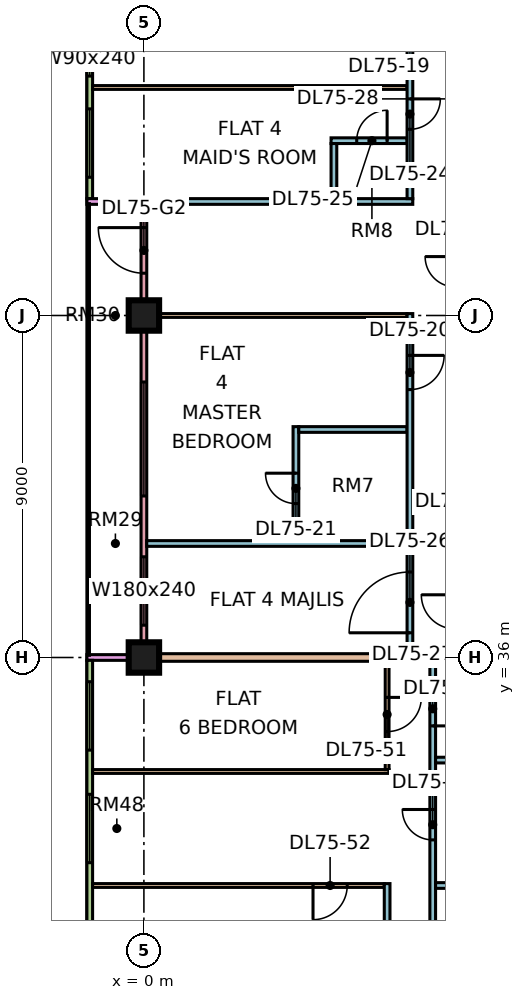
"""IFC4 building model, lengths in metres.
Left out: names, types, materials, properties, quantities, classifications, styles, units other than length and angle.
Written with IfcOpenShell. Run it as: python <this file> out.ifc"""

import sys

from ifc_helpers import new_model, si_unit, direction, frame, frame_2d, origin, origin_2d, place, context, subcontext, project, spatial, rectangle, extrude, element, fill, save


model = new_model("IFC4")
c1 = context("Model", 3, precision=1e-05, world=origin(), true_north=direction((0.0, 1.0)))
c2 = subcontext(c1, "Body", "Model", "MODEL_VIEW")
j1 = project(units=[si_unit("LENGTHUNIT", "METRE"), si_unit("PLANEANGLEUNIT", "RADIAN")], contexts=[c1])
p1 = place(None, origin())
s1 = spatial("IfcSite", under=j1, at=p1, CompositionType="ELEMENT")
p2 = place(p1, origin())
s2 = spatial("IfcBuilding", under=s1, at=p2, CompositionType="ELEMENT")
p3 = place(p2, frame((0.0, 0.0, 318.4)))
s3 = spatial("IfcBuildingStorey", under=s2, at=p3, CompositionType="ELEMENT", Elevation=318.4)
p4 = place(p3, frame((0.0, 36.0, 0.0), z_axis=(0.0, 0.0, 1.0), x_axis=(1.0, 0.0, 0.0)))
e1 = element("IfcColumn", 1, at=p4, inside=s3, PredefinedType="COLUMN", context=c2, shape_type="SweptSolid", body=[
    extrude(rectangle(XDim=0.8, YDim=0.8, at=origin_2d()), origin(), (0.0, 0.0, 1.0), 3.75),
])
p5 = place(p3, frame((0.0, 45.0, 0.0), z_axis=(0.0, 0.0, 1.0), x_axis=(1.0, 0.0, 0.0)))
e2 = element("IfcColumn", 2, at=p5, inside=s3, PredefinedType="COLUMN", context=c2, shape_type="SweptSolid", body=[
    extrude(rectangle(XDim=0.8, YDim=0.8, at=origin_2d()), origin(), (0.0, 0.0, 1.0), 3.75),
])
p6 = place(p3, frame((-1.425, 52.5, 0.0), z_axis=(0.0, 0.0, 1.0), x_axis=(0.0, -1.0, 0.0)))
e3 = element("IfcWall", 3, at=p6, inside=s3, PredefinedType="SOLIDWALL", context=c2, shape_type="SweptSolid", body=[
    extrude(rectangle(XDim=4.425, YDim=0.15, at=frame_2d((2.212, 0.0))), origin(), (0.0, 0.0, 1.0), 3.3),
])
p7 = place(p6, frame((0.3, 0.0, 0.45)))
e4 = element("IfcOpeningElement", 4, at=p7, cuts=e3, PredefinedType="OPENING", context=c2, shape_type="SweptSolid", body=[
    extrude(rectangle(XDim=0.9, YDim=2.4, at=frame_2d((0.45, 1.2))), frame((0.0, 0.085, 0.0), z_axis=(0.0, -1.0, 0.0), x_axis=(1.0, 0.0, 0.0)), (0.0, 0.0, 1.0), 0.17),
])
p8 = place(p6, frame((2.062, 0.0, 0.45)))
e5 = element("IfcOpeningElement", 5, at=p8, cuts=e3, PredefinedType="OPENING", context=c2, shape_type="SweptSolid", body=[
    extrude(rectangle(XDim=1.8, YDim=2.4, at=frame_2d((0.9, 1.2))), frame((0.0, 0.085, 0.0), z_axis=(0.0, -1.0, 0.0), x_axis=(1.0, 0.0, 0.0)), (0.0, 0.0, 1.0), 0.17),
])
p9 = place(p3, frame((0.0, 47.925, 0.0), z_axis=(0.0, 0.0, 1.0), x_axis=(0.0, -1.0, 0.0)))
e6 = element("IfcWall", 6, at=p9, inside=s3, PredefinedType="SOLIDWALL", context=c2, shape_type="SweptSolid", body=[
    extrude(rectangle(XDim=11.85, YDim=0.15, at=frame_2d((5.925, 0.0))), origin(), (0.0, 0.0, 1.0), 3.3),
])
p10 = place(p9, frame((0.613, 0.0, 0.0)))
e7 = element("IfcOpeningElement", 7, at=p10, cuts=e6, PredefinedType="OPENING", context=c2, shape_type="SweptSolid", body=[
    extrude(rectangle(XDim=1.2, YDim=2.4, at=frame_2d((0.6, 1.2))), frame((0.0, 0.085, 0.0), z_axis=(0.0, -1.0, 0.0), x_axis=(1.0, 0.0, 0.0)), (0.0, 0.0, 1.0), 0.17),
])
p11 = place(p9, frame((4.675, 0.0, 0.45)))
e8 = element("IfcOpeningElement", 8, at=p11, cuts=e6, PredefinedType="OPENING", context=c2, shape_type="SweptSolid", body=[
    extrude(rectangle(XDim=3.0, YDim=2.4, at=frame_2d((1.5, 1.2))), frame((0.0, 0.085, 0.0), z_axis=(0.0, -1.0, 0.0), x_axis=(1.0, 0.0, 0.0)), (0.0, 0.0, 1.0), 0.17),
])
p12 = place(p9, frame((9.275, 0.0, 0.45)))
e9 = element("IfcOpeningElement", 9, at=p12, cuts=e6, PredefinedType="OPENING", context=c2, shape_type="SweptSolid", body=[
    extrude(rectangle(XDim=1.8, YDim=2.4, at=frame_2d((0.9, 1.2))), frame((0.0, 0.085, 0.0), z_axis=(0.0, -1.0, 0.0), x_axis=(1.0, 0.0, 0.0)), (0.0, 0.0, 1.0), 0.17),
])
for number, where, z_axis, x_axis in (
    (10, (-1.5, 48.0, 0.0), (0.0, 0.0, 1.0), (1.0, 0.0, 0.0)),
    (11, (-1.5, 36.0, 0.0), (0.0, 0.0, 1.0), (1.0, 0.0, 0.0)),
):
    element("IfcWall", number, at=place(p3, frame(where, z_axis=z_axis, x_axis=x_axis)), inside=s3, PredefinedType="SOLIDWALL", context=c2, shape_type="SweptSolid", body=[
        extrude(rectangle(XDim=1.5, YDim=0.15, at=frame_2d((0.75, 0.0))), origin(), (0.0, 0.0, 1.0), 3.3),
    ])
p13 = place(p3, frame((-1.425, 35.925, 0.0), z_axis=(0.0, 0.0, 1.0), x_axis=(0.0, -1.0, 0.0)))
e12 = element("IfcWall", 12, at=p13, inside=s3, PredefinedType="SOLIDWALL", context=c2, shape_type="SweptSolid", body=[
    extrude(rectangle(XDim=11.85, YDim=0.15, at=frame_2d((5.925, 0.0))), origin(), (0.0, 0.0, 1.0), 3.3),
])
p14 = place(p13, frame((0.562, 0.0, 0.45)))
e13 = element("IfcOpeningElement", 13, at=p14, cuts=e12, PredefinedType="OPENING", context=c2, shape_type="SweptSolid", body=[
    extrude(rectangle(XDim=1.8, YDim=2.4, at=frame_2d((0.9, 1.2))), frame((0.0, 0.085, 0.0), z_axis=(0.0, -1.0, 0.0), x_axis=(1.0, 0.0, 0.0)), (0.0, 0.0, 1.0), 0.17),
])
p15 = place(p13, frame((3.525, 0.0, 0.45)))
e14 = element("IfcOpeningElement", 14, at=p15, cuts=e12, PredefinedType="OPENING", context=c2, shape_type="SweptSolid", body=[
    extrude(rectangle(XDim=1.8, YDim=2.4, at=frame_2d((0.9, 1.2))), frame((0.0, 0.085, 0.0), z_axis=(0.0, -1.0, 0.0), x_axis=(1.0, 0.0, 0.0)), (0.0, 0.0, 1.0), 0.17),
])
p16 = place(p13, frame((7.387, 0.0, 0.45)))
e15 = element("IfcOpeningElement", 15, at=p16, cuts=e12, PredefinedType="OPENING", context=c2, shape_type="SweptSolid", body=[
    extrude(rectangle(XDim=3.0, YDim=2.4, at=frame_2d((1.5, 1.2))), frame((0.0, 0.085, 0.0), z_axis=(0.0, -1.0, 0.0), x_axis=(1.0, 0.0, 0.0)), (0.0, 0.0, 1.0), 0.17),
])
p17 = place(p3, frame((-1.351, 51.0, 0.0), z_axis=(0.0, 0.0, 1.0), x_axis=(1.0, 0.0, 0.0)))
e16 = element("IfcWall", 16, at=p17, inside=s3, PredefinedType="PARTITIONING", context=c2, shape_type="SweptSolid", body=[
    extrude(rectangle(XDim=8.276, YDim=0.1, at=frame_2d((4.138, 0.0))), origin(), (0.0, 0.0, 1.0), 3.3),
])
p18 = place(p3, frame((-1.35, 30.0, 0.0), z_axis=(0.0, 0.0, 1.0), x_axis=(1.0, 0.0, 0.0)))
e17 = element("IfcWall", 17, at=p18, inside=s3, PredefinedType="PARTITIONING", context=c2, shape_type="SweptSolid", body=[
    extrude(rectangle(XDim=7.675, YDim=0.1, at=frame_2d((3.837, 0.0))), origin(), (0.0, 0.0, 1.0), 3.3),
])
p19 = place(p18, frame((5.8, 0.0, 0.0)))
e18 = element("IfcOpeningElement", 18, at=p19, cuts=e17, PredefinedType="OPENING", context=c2, shape_type="SweptSolid", body=[
    extrude(rectangle(XDim=0.9, YDim=2.1, at=frame_2d((0.45, 1.05))), frame((0.0, 0.06, 0.0), z_axis=(0.0, -1.0, 0.0), x_axis=(1.0, 0.0, 0.0)), (0.0, 0.0, 1.0), 0.12),
])
p20 = place(p3, frame((-1.35, 33.0, 0.0), z_axis=(0.0, 0.0, 1.0), x_axis=(1.0, 0.0, 0.0)))
e19 = element("IfcWall", 19, at=p20, inside=s3, PredefinedType="PARTITIONING", context=c2, shape_type="SweptSolid", body=[
    extrude(rectangle(XDim=7.8, YDim=0.1, at=frame_2d((3.9, 0.0))), origin(), (0.0, 0.0, 1.0), 3.3),
])
e20 = element("IfcWall", 20, at=p4, inside=s3, PredefinedType="PARTITIONING", context=c2, shape_type="SweptSolid", body=[
    extrude(rectangle(XDim=12.3, YDim=0.2, at=frame_2d((6.15, 0.0))), origin(), (0.0, 0.0, 1.0), 3.3),
])
p21 = place(p3, frame((0.0, 48.0, 0.0), z_axis=(0.0, 0.0, 1.0), x_axis=(1.0, 0.0, 0.0)))
e21 = element("IfcWall", 21, at=p21, inside=s3, PredefinedType="PARTITIONING", context=c2, shape_type="SweptSolid", body=[
    extrude(rectangle(XDim=7.075, YDim=0.15, at=frame_2d((3.538, 0.0))), origin(), (0.0, 0.0, 1.0), 3.3),
])
p22 = place(p3, frame((0.074, 39.0, 0.0), z_axis=(0.0, 0.0, 1.0), x_axis=(1.0, 0.0, 0.0)))
e22 = element("IfcWall", 22, at=p22, inside=s3, PredefinedType="PARTITIONING", context=c2, shape_type="SweptSolid", body=[
    extrude(rectangle(XDim=6.851, YDim=0.15, at=frame_2d((3.426, 0.0))), origin(), (0.0, 0.0, 1.0), 3.3),
])
p23 = place(p3, frame((0.074, 45.0, 0.0), z_axis=(0.0, 0.0, 1.0), x_axis=(1.0, 0.0, 0.0)))
e23 = element("IfcWall", 23, at=p23, inside=s3, PredefinedType="PARTITIONING", context=c2, shape_type="SweptSolid", body=[
    extrude(rectangle(XDim=6.851, YDim=0.1, at=frame_2d((3.426, 0.0))), origin(), (0.0, 0.0, 1.0), 3.3),
])
p24 = place(p3, frame((4.0, 39.075, 0.0), z_axis=(0.0, 0.0, 1.0), x_axis=(0.0, 1.0, 0.0)))
e24 = element("IfcWall", 24, at=p24, inside=s3, PredefinedType="PARTITIONING", context=c2, shape_type="SweptSolid", body=[
    extrude(rectangle(XDim=3.0, YDim=0.15, at=frame_2d((1.5, 0.0))), origin(), (0.0, 0.0, 1.0), 3.3),
])
p25 = place(p24, frame((0.975, 0.0, 0.0)))
e25 = element("IfcOpeningElement", 25, at=p25, cuts=e24, PredefinedType="OPENING", context=c2, shape_type="SweptSolid", body=[
    extrude(rectangle(XDim=0.8, YDim=2.1, at=frame_2d((0.4, 1.05))), frame((0.0, 0.085, 0.0), z_axis=(0.0, -1.0, 0.0), x_axis=(1.0, 0.0, 0.0)), (0.0, 0.0, 1.0), 0.17),
])
p26 = place(p3, frame((4.075, 42.0, 0.0), z_axis=(0.0, 0.0, 1.0), x_axis=(1.0, 0.0, 0.0)))
e26 = element("IfcWall", 26, at=p26, inside=s3, PredefinedType="PARTITIONING", context=c2, shape_type="SweptSolid", body=[
    extrude(rectangle(XDim=2.85, YDim=0.15, at=frame_2d((1.425, 0.0))), origin(), (0.0, 0.0, 1.0), 3.3),
])
p27 = place(p3, frame((4.925, 49.6, 0.0), z_axis=(0.0, 0.0, 1.0), x_axis=(1.0, 0.0, 0.0)))
e27 = element("IfcWall", 27, at=p27, inside=s3, PredefinedType="PARTITIONING", context=c2, shape_type="SweptSolid", body=[
    extrude(rectangle(XDim=2.0, YDim=0.15, at=frame_2d((1.0, 0.0))), origin(), (0.0, 0.0, 1.0), 3.3),
])
p28 = place(p27, frame((0.675, 0.0, 0.0)))
e28 = element("IfcOpeningElement", 28, at=p28, cuts=e27, PredefinedType="OPENING", context=c2, shape_type="SweptSolid", body=[
    extrude(rectangle(XDim=0.8, YDim=2.1, at=frame_2d((0.4, 1.05))), frame((0.0, 0.085, 0.0), z_axis=(0.0, -1.0, 0.0), x_axis=(1.0, 0.0, 0.0)), (0.0, 0.0, 1.0), 0.17),
])
p29 = place(p3, frame((5.0, 48.075, 0.0), z_axis=(0.0, 0.0, 1.0), x_axis=(0.0, 1.0, 0.0)))
e29 = element("IfcWall", 29, at=p29, inside=s3, PredefinedType="PARTITIONING", context=c2, shape_type="SweptSolid", body=[
    extrude(rectangle(XDim=1.45, YDim=0.15, at=frame_2d((0.725, 0.0))), origin(), (0.0, 0.0, 1.0), 3.3),
])
p30 = place(p3, frame((6.4, 22.5, 0.0), z_axis=(0.0, 0.0, 1.0), x_axis=(0.0, 1.0, 0.0)))
e30 = element("IfcWall", 30, at=p30, inside=s3, PredefinedType="PARTITIONING", context=c2, shape_type="SweptSolid", body=[
    extrude(rectangle(XDim=7.55, YDim=0.15, at=frame_2d((3.775, 0.0))), origin(), (0.0, 0.0, 1.0), 3.3),
])
p31 = place(p3, frame((6.4, 33.05, 0.0), z_axis=(0.0, 0.0, 1.0), x_axis=(0.0, 1.0, 0.0)))
e31 = element("IfcWall", 31, at=p31, inside=s3, PredefinedType="PARTITIONING", context=c2, shape_type="SweptSolid", body=[
    extrude(rectangle(XDim=2.85, YDim=0.1, at=frame_2d((1.425, 0.0))), origin(), (0.0, 0.0, 1.0), 3.3),
])
p32 = place(p31, frame((1.0, 0.0, 0.0)))
e32 = element("IfcOpeningElement", 32, at=p32, cuts=e31, PredefinedType="OPENING", context=c2, shape_type="SweptSolid", body=[
    extrude(rectangle(XDim=0.9, YDim=2.1, at=frame_2d((0.45, 1.05))), frame((0.0, 0.06, 0.0), z_axis=(0.0, -1.0, 0.0), x_axis=(1.0, 0.0, 0.0)), (0.0, 0.0, 1.0), 0.12),
])
p33 = place(p3, frame((7.0, 36.1, 0.0), z_axis=(0.0, 0.0, 1.0), x_axis=(0.0, 1.0, 0.0)))
e33 = element("IfcWall", 33, at=p33, inside=s3, PredefinedType="PARTITIONING", context=c2, shape_type="SweptSolid", body=[
    extrude(rectangle(XDim=8.95, YDim=0.15, at=frame_2d((4.475, 0.0))), origin(), (0.0, 0.0, 1.0), 3.3),
])
p34 = place(p33, frame((6.95, 0.0, 0.0)))
e34 = element("IfcOpeningElement", 34, at=p34, cuts=e33, PredefinedType="OPENING", context=c2, shape_type="SweptSolid", body=[
    extrude(rectangle(XDim=0.9, YDim=2.1, at=frame_2d((0.45, 1.05))), frame((0.0, 0.085, 0.0), z_axis=(0.0, -1.0, 0.0), x_axis=(1.0, 0.0, 0.0)), (0.0, 0.0, 1.0), 0.17),
])
p35 = place(p33, frame((0.55, 0.0, 0.0)))
e35 = element("IfcOpeningElement", 35, at=p35, cuts=e33, PredefinedType="OPENING", context=c2, shape_type="SweptSolid", body=[
    extrude(rectangle(XDim=1.6, YDim=2.1, at=frame_2d((0.8, 1.05))), frame((0.0, 0.085, 0.0), z_axis=(0.0, -1.0, 0.0), x_axis=(1.0, 0.0, 0.0)), (0.0, 0.0, 1.0), 0.17),
])
p36 = place(p3, frame((7.0, 48.075, 0.0), z_axis=(0.0, 0.0, 1.0), x_axis=(0.0, 1.0, 0.0)))
e36 = element("IfcWall", 36, at=p36, inside=s3, PredefinedType="PARTITIONING", context=c2, shape_type="SweptSolid", body=[
    extrude(rectangle(XDim=7.275, YDim=0.15, at=frame_2d((3.638, 0.0))), origin(), (0.0, 0.0, 1.0), 3.3),
])
p37 = place(p36, frame((3.975, 0.0, 0.0)))
e37 = element("IfcOpeningElement", 37, at=p37, cuts=e36, PredefinedType="OPENING", context=c2, shape_type="SweptSolid", body=[
    extrude(rectangle(XDim=0.9, YDim=2.1, at=frame_2d((0.45, 1.05))), frame((0.0, 0.085, 0.0), z_axis=(0.0, -1.0, 0.0), x_axis=(1.0, 0.0, 0.0)), (0.0, 0.0, 1.0), 0.17),
])
p38 = place(p36, frame((1.825, 0.0, 0.0)))
e38 = element("IfcOpeningElement", 38, at=p38, cuts=e36, PredefinedType="OPENING", context=c2, shape_type="SweptSolid", body=[
    extrude(rectangle(XDim=0.8, YDim=2.1, at=frame_2d((0.4, 1.05))), frame((0.0, 0.085, 0.0), z_axis=(0.0, -1.0, 0.0), x_axis=(1.0, 0.0, 0.0)), (0.0, 0.0, 1.0), 0.17),
])
p39 = place(p3, frame((7.6, 27.55, 0.0), z_axis=(0.0, 0.0, 1.0), x_axis=(0.0, 1.0, 0.0)))
e39 = element("IfcWall", 39, at=p39, inside=s3, PredefinedType="PARTITIONING", context=c2, shape_type="SweptSolid", body=[
    extrude(rectangle(XDim=8.35, YDim=0.15, at=frame_2d((4.175, 0.0))), origin(), (0.0, 0.0, 1.0), 3.3),
])
p40 = place(p39, frame((3.65, 0.0, 0.0)))
e40 = element("IfcOpeningElement", 40, at=p40, cuts=e39, PredefinedType="OPENING", context=c2, shape_type="SweptSolid", body=[
    extrude(rectangle(XDim=0.8, YDim=2.1, at=frame_2d((0.4, 1.05))), frame((0.0, 0.085, 0.0), z_axis=(0.0, -1.0, 0.0), x_axis=(1.0, 0.0, 0.0)), (0.0, 0.0, 1.0), 0.17),
])
p41 = place(p39, frame((6.65, 0.0, 0.0)))
e41 = element("IfcOpeningElement", 41, at=p41, cuts=e39, PredefinedType="OPENING", context=c2, shape_type="SweptSolid", body=[
    extrude(rectangle(XDim=0.9, YDim=2.1, at=frame_2d((0.45, 1.05))), frame((0.0, 0.085, 0.0), z_axis=(0.0, -1.0, 0.0), x_axis=(1.0, 0.0, 0.0)), (0.0, 0.0, 1.0), 0.17),
])
for number, where, z_axis, x_axis in (
    (42, (7.675, 30.0, 0.0), (0.0, 0.0, 1.0), (1.0, 0.0, 0.0)),
    (43, (7.675, 33.3, 0.0), (0.0, 0.0, 1.0), (1.0, 0.0, 0.0)),
):
    element("IfcWall", number, at=place(p3, frame(where, z_axis=z_axis, x_axis=x_axis)), inside=s3, PredefinedType="PARTITIONING", context=c2, shape_type="SweptSolid", body=[
        extrude(rectangle(XDim=4.625, YDim=0.15, at=frame_2d((2.312, 0.0))), origin(), (0.0, 0.0, 1.0), 3.3),
    ])
p42 = place(p7, origin())
e44 = element("IfcWindow", 44, at=p42, inside=s3, PartitioningType="SINGLE_PANEL", PredefinedType="WINDOW", context=c2, shape_type="SweptSolid", body=[
    extrude(rectangle(XDim=0.9, YDim=2.4, at=frame_2d((0.45, 1.2))), frame((0.0, 0.03, 0.0), z_axis=(0.0, -1.0, 0.0), x_axis=(1.0, 0.0, 0.0)), (0.0, 0.0, 1.0), 0.06),
])
fill(e4, e44)
p43 = place(p8, origin())
e45 = element("IfcWindow", 45, at=p43, inside=s3, PartitioningType="SINGLE_PANEL", PredefinedType="WINDOW", context=c2, shape_type="SweptSolid", body=[
    extrude(rectangle(XDim=1.8, YDim=2.4, at=frame_2d((0.9, 1.2))), frame((0.0, 0.03, 0.0), z_axis=(0.0, -1.0, 0.0), x_axis=(1.0, 0.0, 0.0)), (0.0, 0.0, 1.0), 0.06),
])
fill(e5, e45)
p44 = place(p10, frame((1.2, 0.0, 0.0), z_axis=(0.0, 0.0, 1.0), x_axis=(-1.0, 0.0, 0.0)))
e46 = element("IfcDoor", 46, at=p44, inside=s3, OperationType="DOUBLE_DOOR_SINGLE_SWING", PredefinedType="DOOR", context=c2, shape_type="SweptSolid", body=[
    extrude(rectangle(XDim=1.2, YDim=2.4, at=frame_2d((0.6, 1.2))), frame((0.0, 0.025, 0.0), z_axis=(0.0, -1.0, 0.0), x_axis=(1.0, 0.0, 0.0)), (0.0, 0.0, 1.0), 0.05),
])
fill(e7, e46)
p45 = place(p11, origin())
e47 = element("IfcWindow", 47, at=p45, inside=s3, PartitioningType="SINGLE_PANEL", PredefinedType="WINDOW", context=c2, shape_type="SweptSolid", body=[
    extrude(rectangle(XDim=3.0, YDim=2.4, at=frame_2d((1.5, 1.2))), frame((0.0, 0.03, 0.0), z_axis=(0.0, -1.0, 0.0), x_axis=(1.0, 0.0, 0.0)), (0.0, 0.0, 1.0), 0.06),
])
fill(e8, e47)
p46 = place(p12, origin())
e48 = element("IfcWindow", 48, at=p46, inside=s3, PartitioningType="SINGLE_PANEL", PredefinedType="WINDOW", context=c2, shape_type="SweptSolid", body=[
    extrude(rectangle(XDim=1.8, YDim=2.4, at=frame_2d((0.9, 1.2))), frame((0.0, 0.03, 0.0), z_axis=(0.0, -1.0, 0.0), x_axis=(1.0, 0.0, 0.0)), (0.0, 0.0, 1.0), 0.06),
])
fill(e9, e48)
p47 = place(p14, origin())
e49 = element("IfcWindow", 49, at=p47, inside=s3, PartitioningType="SINGLE_PANEL", PredefinedType="WINDOW", context=c2, shape_type="SweptSolid", body=[
    extrude(rectangle(XDim=1.8, YDim=2.4, at=frame_2d((0.9, 1.2))), frame((0.0, 0.03, 0.0), z_axis=(0.0, -1.0, 0.0), x_axis=(1.0, 0.0, 0.0)), (0.0, 0.0, 1.0), 0.06),
])
fill(e13, e49)
p48 = place(p15, origin())
e50 = element("IfcWindow", 50, at=p48, inside=s3, PartitioningType="SINGLE_PANEL", PredefinedType="WINDOW", context=c2, shape_type="SweptSolid", body=[
    extrude(rectangle(XDim=1.8, YDim=2.4, at=frame_2d((0.9, 1.2))), frame((0.0, 0.03, 0.0), z_axis=(0.0, -1.0, 0.0), x_axis=(1.0, 0.0, 0.0)), (0.0, 0.0, 1.0), 0.06),
])
fill(e14, e50)
p49 = place(p34, origin())
e51 = element("IfcDoor", 51, at=p49, inside=s3, OperationType="SINGLE_SWING_RIGHT", PredefinedType="DOOR", context=c2, shape_type="SweptSolid", body=[
    extrude(rectangle(XDim=0.9, YDim=2.1, at=frame_2d((0.45, 1.05))), frame((0.0, 0.025, 0.0), z_axis=(0.0, -1.0, 0.0), x_axis=(1.0, 0.0, 0.0)), (0.0, 0.0, 1.0), 0.05),
])
fill(e34, e51)
p50 = place(p25, frame((0.8, 0.0, 0.0), z_axis=(0.0, 0.0, 1.0), x_axis=(-1.0, 0.0, 0.0)))
e52 = element("IfcDoor", 52, at=p50, inside=s3, OperationType="SINGLE_SWING_RIGHT", PredefinedType="DOOR", context=c2, shape_type="SweptSolid", body=[
    extrude(rectangle(XDim=0.8, YDim=2.1, at=frame_2d((0.4, 1.05))), frame((0.0, 0.025, 0.0), z_axis=(0.0, -1.0, 0.0), x_axis=(1.0, 0.0, 0.0)), (0.0, 0.0, 1.0), 0.05),
])
fill(e25, e52)
p51 = place(p38, origin())
e53 = element("IfcDoor", 53, at=p51, inside=s3, OperationType="SINGLE_SWING_RIGHT", PredefinedType="DOOR", context=c2, shape_type="SweptSolid", body=[
    extrude(rectangle(XDim=0.8, YDim=2.1, at=frame_2d((0.4, 1.05))), frame((0.0, 0.025, 0.0), z_axis=(0.0, -1.0, 0.0), x_axis=(1.0, 0.0, 0.0)), (0.0, 0.0, 1.0), 0.05),
])
fill(e38, e53)
p52 = place(p28, frame((0.8, 0.0, 0.0), z_axis=(0.0, 0.0, 1.0), x_axis=(-1.0, 0.0, 0.0)))
e54 = element("IfcDoor", 54, at=p52, inside=s3, OperationType="SINGLE_SWING_RIGHT", PredefinedType="DOOR", context=c2, shape_type="SweptSolid", body=[
    extrude(rectangle(XDim=0.8, YDim=2.1, at=frame_2d((0.4, 1.05))), frame((0.0, 0.025, 0.0), z_axis=(0.0, -1.0, 0.0), x_axis=(1.0, 0.0, 0.0)), (0.0, 0.0, 1.0), 0.05),
])
fill(e28, e54)
p53 = place(p35, origin())
e55 = element("IfcDoor", 55, at=p53, inside=s3, OperationType="DOUBLE_DOOR_SINGLE_SWING", PredefinedType="DOOR", context=c2, shape_type="SweptSolid", body=[
    extrude(rectangle(XDim=1.6, YDim=2.1, at=frame_2d((0.8, 1.05))), frame((0.0, 0.025, 0.0), z_axis=(0.0, -1.0, 0.0), x_axis=(1.0, 0.0, 0.0)), (0.0, 0.0, 1.0), 0.05),
])
fill(e35, e55)
p54 = place(p40, frame((0.8, 0.0, 0.0), z_axis=(0.0, 0.0, 1.0), x_axis=(-1.0, 0.0, 0.0)))
e56 = element("IfcDoor", 56, at=p54, inside=s3, OperationType="SINGLE_SWING_RIGHT", PredefinedType="DOOR", context=c2, shape_type="SweptSolid", body=[
    extrude(rectangle(XDim=0.8, YDim=2.1, at=frame_2d((0.4, 1.05))), frame((0.0, 0.025, 0.0), z_axis=(0.0, -1.0, 0.0), x_axis=(1.0, 0.0, 0.0)), (0.0, 0.0, 1.0), 0.05),
])
fill(e40, e56)
p55 = place(p32, origin())
e57 = element("IfcDoor", 57, at=p55, inside=s3, OperationType="SINGLE_SWING_RIGHT", PredefinedType="DOOR", context=c2, shape_type="SweptSolid", body=[
    extrude(rectangle(XDim=0.9, YDim=2.1, at=frame_2d((0.45, 1.05))), frame((0.0, 0.025, 0.0), z_axis=(0.0, -1.0, 0.0), x_axis=(1.0, 0.0, 0.0)), (0.0, 0.0, 1.0), 0.05),
])
fill(e32, e57)
p56 = place(p19, frame((0.9, 0.0, 0.0), z_axis=(0.0, 0.0, 1.0), x_axis=(-1.0, 0.0, 0.0)))
e58 = element("IfcDoor", 58, at=p56, inside=s3, OperationType="SINGLE_SWING_LEFT", PredefinedType="DOOR", context=c2, shape_type="SweptSolid", body=[
    extrude(rectangle(XDim=0.9, YDim=2.1, at=frame_2d((0.45, 1.05))), frame((0.0, 0.025, 0.0), z_axis=(0.0, -1.0, 0.0), x_axis=(1.0, 0.0, 0.0)), (0.0, 0.0, 1.0), 0.05),
])
fill(e18, e58)
p57 = place(p41, frame((0.9, 0.0, 0.0), z_axis=(0.0, 0.0, 1.0), x_axis=(-1.0, 0.0, 0.0)))
e59 = element("IfcDoor", 59, at=p57, inside=s3, OperationType="SINGLE_SWING_LEFT", PredefinedType="DOOR", context=c2, shape_type="SweptSolid", body=[
    extrude(rectangle(XDim=0.9, YDim=2.1, at=frame_2d((0.45, 1.05))), frame((0.0, 0.025, 0.0), z_axis=(0.0, -1.0, 0.0), x_axis=(1.0, 0.0, 0.0)), (0.0, 0.0, 1.0), 0.05),
])
fill(e41, e59)
save(model, sys.argv[1])
